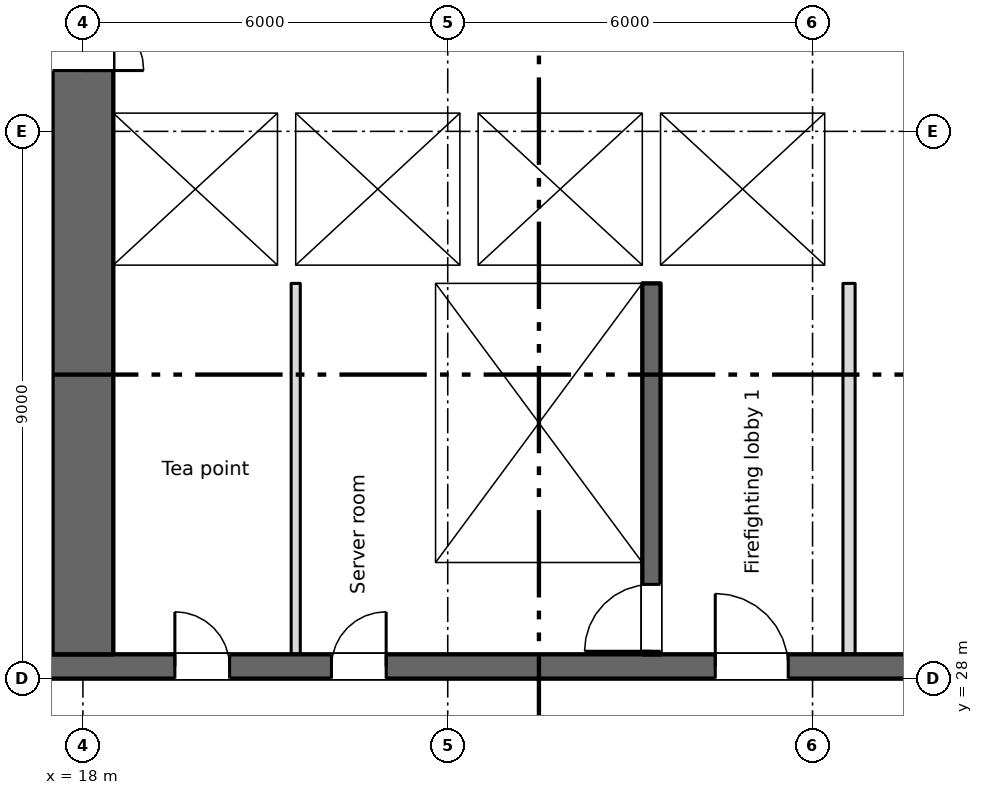
"""IFC4 building model, lengths in metres.
Left out: names, types, materials, properties, quantities, classifications, styles, units other than length and angle.
Written with IfcOpenShell. Run it as: python <this file> out.ifc"""

import sys

from ifc_helpers import new_model, si_unit, direction, frame, frame_2d, origin, place, context, subcontext, project, spatial, rectangle, extrude, element, fill, save


model = new_model("IFC4")
c1 = context("Model", 3, precision=1e-05, world=origin(), true_north=direction((0.0, 1.0)))
c2 = subcontext(c1, "Body", "Model", "MODEL_VIEW")
j1 = project(units=[si_unit("LENGTHUNIT", "METRE"), si_unit("PLANEANGLEUNIT", "RADIAN")], contexts=[c1])
p1 = place(None, origin())
s1 = spatial("IfcSite", under=j1, at=p1, CompositionType="ELEMENT")
p2 = place(p1, origin())
s2 = spatial("IfcBuilding", under=s1, at=p2, CompositionType="ELEMENT")
p3 = place(p2, frame((0.0, 0.0, 45.0)))
s3 = spatial("IfcBuildingStorey", under=s2, at=p3, CompositionType="ELEMENT", Elevation=45.0)
p4 = place(p3, frame((6.7, 28.2, 0.0), z_axis=(0.0, 0.0, 1.0), x_axis=(1.0, 0.0, 0.0)))
e1 = element("IfcWall", 1, at=p4, inside=s3, PredefinedType="SHEAR", context=c2, shape_type="SweptSolid", body=[
    extrude(rectangle(XDim=57.8, YDim=0.4, at=frame_2d((28.9, 0.0))), origin(), (0.0, 0.0, 1.0), 3.35),
])
p5 = place(p4, frame((12.812, 0.0, 0.0)))
e2 = element("IfcOpeningElement", 2, at=p5, cuts=e1, PredefinedType="OPENING", context=c2, shape_type="SweptSolid", body=[
    extrude(rectangle(XDim=0.9, YDim=2.1, at=frame_2d((0.45, 1.05))), frame((0.0, 0.21, 0.0), z_axis=(0.0, -1.0, 0.0), x_axis=(1.0, 0.0, 0.0)), (0.0, 0.0, 1.0), 0.42),
])
p6 = place(p4, frame((15.387, 0.0, 0.0)))
e3 = element("IfcOpeningElement", 3, at=p6, cuts=e1, PredefinedType="OPENING", context=c2, shape_type="SweptSolid", body=[
    extrude(rectangle(XDim=0.9, YDim=2.1, at=frame_2d((0.45, 1.05))), frame((0.0, 0.21, 0.0), z_axis=(0.0, -1.0, 0.0), x_axis=(1.0, 0.0, 0.0)), (0.0, 0.0, 1.0), 0.42),
])
p7 = place(p4, frame((48.312, 0.0, 0.0)))
e4 = element("IfcOpeningElement", 4, at=p7, cuts=e1, PredefinedType="OPENING", context=c2, shape_type="SweptSolid", body=[
    extrude(rectangle(XDim=0.9, YDim=2.1, at=frame_2d((0.45, 1.05))), frame((0.0, 0.21, 0.0), z_axis=(0.0, -1.0, 0.0), x_axis=(1.0, 0.0, 0.0)), (0.0, 0.0, 1.0), 0.42),
])
p8 = place(p4, frame((50.887, 0.0, 0.0)))
e5 = element("IfcOpeningElement", 5, at=p8, cuts=e1, PredefinedType="OPENING", context=c2, shape_type="SweptSolid", body=[
    extrude(rectangle(XDim=0.9, YDim=2.1, at=frame_2d((0.45, 1.05))), frame((0.0, 0.21, 0.0), z_axis=(0.0, -1.0, 0.0), x_axis=(1.0, 0.0, 0.0)), (0.0, 0.0, 1.0), 0.42),
])
p9 = place(p4, frame((0.562, 0.0, 0.0)))
e6 = element("IfcOpeningElement", 6, at=p9, cuts=e1, PredefinedType="OPENING", context=c2, shape_type="SweptSolid", body=[
    extrude(rectangle(XDim=0.9, YDim=2.1, at=frame_2d((0.45, 1.05))), frame((0.0, 0.21, 0.0), z_axis=(0.0, -1.0, 0.0), x_axis=(1.0, 0.0, 0.0)), (0.0, 0.0, 1.0), 0.42),
])
p10 = place(p4, frame((2.137, 0.0, 0.0)))
e7 = element("IfcOpeningElement", 7, at=p10, cuts=e1, PredefinedType="OPENING", context=c2, shape_type="SweptSolid", body=[
    extrude(rectangle(XDim=0.9, YDim=2.1, at=frame_2d((0.45, 1.05))), frame((0.0, 0.21, 0.0), z_axis=(0.0, -1.0, 0.0), x_axis=(1.0, 0.0, 0.0)), (0.0, 0.0, 1.0), 0.42),
])
p11 = place(p4, frame((4.7, 0.0, 0.0)))
e8 = element("IfcOpeningElement", 8, at=p11, cuts=e1, PredefinedType="OPENING", context=c2, shape_type="SweptSolid", body=[
    extrude(rectangle(XDim=1.2, YDim=2.1, at=frame_2d((0.6, 1.05))), frame((0.0, 0.21, 0.0), z_axis=(0.0, -1.0, 0.0), x_axis=(1.0, 0.0, 0.0)), (0.0, 0.0, 1.0), 0.42),
])
p12 = place(p4, frame((31.7, 0.0, 0.0)))
e9 = element("IfcOpeningElement", 9, at=p12, cuts=e1, PredefinedType="OPENING", context=c2, shape_type="SweptSolid", body=[
    extrude(rectangle(XDim=1.2, YDim=2.1, at=frame_2d((0.6, 1.05))), frame((0.0, 0.21, 0.0), z_axis=(0.0, -1.0, 0.0), x_axis=(1.0, 0.0, 0.0)), (0.0, 0.0, 1.0), 0.42),
])
p13 = place(p4, frame((55.2, 0.0, 0.0)))
e10 = element("IfcOpeningElement", 10, at=p13, cuts=e1, PredefinedType="OPENING", context=c2, shape_type="SweptSolid", body=[
    extrude(rectangle(XDim=1.2, YDim=2.1, at=frame_2d((0.6, 1.05))), frame((0.0, 0.21, 0.0), z_axis=(0.0, -1.0, 0.0), x_axis=(1.0, 0.0, 0.0)), (0.0, 0.0, 1.0), 0.42),
])
p14 = place(p4, frame((21.7, 0.0, 0.0)))
e11 = element("IfcOpeningElement", 11, at=p14, cuts=e1, PredefinedType="OPENING", context=c2, shape_type="SweptSolid", body=[
    extrude(rectangle(XDim=1.2, YDim=2.1, at=frame_2d((0.6, 1.05))), frame((0.0, 0.21, 0.0), z_axis=(0.0, -1.0, 0.0), x_axis=(1.0, 0.0, 0.0)), (0.0, 0.0, 1.0), 0.42),
])
p15 = place(p4, frame((41.7, 0.0, 0.0)))
e12 = element("IfcOpeningElement", 12, at=p15, cuts=e1, PredefinedType="OPENING", context=c2, shape_type="SweptSolid", body=[
    extrude(rectangle(XDim=1.2, YDim=2.1, at=frame_2d((0.6, 1.05))), frame((0.0, 0.21, 0.0), z_axis=(0.0, -1.0, 0.0), x_axis=(1.0, 0.0, 0.0)), (0.0, 0.0, 1.0), 0.42),
])
p16 = place(p4, frame((24.85, 0.0, 0.0)))
e13 = element("IfcOpeningElement", 13, at=p16, cuts=e1, PredefinedType="OPENING", context=c2, shape_type="SweptSolid", body=[
    extrude(rectangle(XDim=2.4, YDim=2.1, at=frame_2d((1.2, 1.05))), frame((0.0, 0.21, 0.0), z_axis=(0.0, -1.0, 0.0), x_axis=(1.0, 0.0, 0.0)), (0.0, 0.0, 1.0), 0.42),
])
p17 = place(p4, frame((37.35, 0.0, 0.0)))
e14 = element("IfcOpeningElement", 14, at=p17, cuts=e1, PredefinedType="OPENING", context=c2, shape_type="SweptSolid", body=[
    extrude(rectangle(XDim=2.4, YDim=2.1, at=frame_2d((1.2, 1.05))), frame((0.0, 0.21, 0.0), z_axis=(0.0, -1.0, 0.0), x_axis=(1.0, 0.0, 0.0)), (0.0, 0.0, 1.0), 0.42),
])
p18 = place(p4, frame((7.85, 0.0, 0.0)))
e15 = element("IfcOpeningElement", 15, at=p18, cuts=e1, PredefinedType="OPENING", context=c2, shape_type="SweptSolid", body=[
    extrude(rectangle(XDim=2.4, YDim=2.1, at=frame_2d((1.2, 1.05))), frame((0.0, 0.21, 0.0), z_axis=(0.0, -1.0, 0.0), x_axis=(1.0, 0.0, 0.0)), (0.0, 0.0, 1.0), 0.42),
])
p19 = place(p4, frame((28.85, 0.0, 0.0)))
e16 = element("IfcOpeningElement", 16, at=p19, cuts=e1, PredefinedType="OPENING", context=c2, shape_type="SweptSolid", body=[
    extrude(rectangle(XDim=0.9, YDim=2.1, at=frame_2d((0.45, 1.05))), frame((0.0, 0.21, 0.0), z_axis=(0.0, -1.0, 0.0), x_axis=(1.0, 0.0, 0.0)), (0.0, 0.0, 1.0), 0.42),
])
p20 = place(p4, frame((34.85, 0.0, 0.0)))
e17 = element("IfcOpeningElement", 17, at=p20, cuts=e1, PredefinedType="OPENING", context=c2, shape_type="SweptSolid", body=[
    extrude(rectangle(XDim=0.9, YDim=2.1, at=frame_2d((0.45, 1.05))), frame((0.0, 0.21, 0.0), z_axis=(0.0, -1.0, 0.0), x_axis=(1.0, 0.0, 0.0)), (0.0, 0.0, 1.0), 0.42),
])
p21 = place(p3, frame((18.0, 28.4, 0.0), z_axis=(0.0, 0.0, 1.0), x_axis=(0.0, 1.0, 0.0)))
e18 = element("IfcWall", 18, at=p21, inside=s3, PredefinedType="SHEAR", context=c2, shape_type="SweptSolid", body=[
    extrude(rectangle(XDim=16.6, YDim=1.0, at=frame_2d((8.3, 0.0))), origin(), (0.0, 0.0, 1.0), 3.35),
])
p22 = place(p21, frame((9.6, 0.0, 0.0)))
e19 = element("IfcOpeningElement", 19, at=p22, cuts=e18, PredefinedType="OPENING", context=c2, shape_type="SweptSolid", body=[
    extrude(rectangle(XDim=2.0, YDim=2.1, at=frame_2d((1.0, 1.05))), frame((0.0, 0.51, 0.0), z_axis=(0.0, -1.0, 0.0), x_axis=(1.0, 0.0, 0.0)), (0.0, 0.0, 1.0), 1.02),
])
p23 = place(p21, frame((15.25, 0.0, 0.0)))
e20 = element("IfcOpeningElement", 20, at=p23, cuts=e18, PredefinedType="OPENING", context=c2, shape_type="SweptSolid", body=[
    extrude(rectangle(XDim=1.2, YDim=2.1, at=frame_2d((0.6, 1.05))), frame((0.0, 0.51, 0.0), z_axis=(0.0, -1.0, 0.0), x_axis=(1.0, 0.0, 0.0)), (0.0, 0.0, 1.0), 1.02),
])
p24 = place(p3, frame((23.65, 28.4, 0.0), z_axis=(0.0, 0.0, 1.0), x_axis=(0.0, 1.0, 0.0)))
e21 = element("IfcWall", 21, at=p24, inside=s3, PredefinedType="SHEAR", context=c2, shape_type="SweptSolid", body=[
    extrude(rectangle(XDim=6.1, YDim=0.3, at=frame_2d((3.05, 0.0))), origin(), (0.0, 0.0, 1.0), 3.35),
])
p25 = place(p3, frame((27.35, 28.4, 0.0), z_axis=(0.0, 0.0, 1.0), x_axis=(0.0, 1.0, 0.0)))
e22 = element("IfcWall", 22, at=p25, inside=s3, PredefinedType="SHEAR", context=c2, shape_type="SweptSolid", body=[
    extrude(rectangle(XDim=6.1, YDim=0.3, at=frame_2d((3.05, 0.0))), origin(), (0.0, 0.0, 1.0), 3.35),
])
p26 = place(p25, frame((0.05, 0.0, 0.0)))
e23 = element("IfcOpeningElement", 23, at=p26, cuts=e22, PredefinedType="OPENING", context=c2, shape_type="SweptSolid", body=[
    extrude(rectangle(XDim=1.1, YDim=2.1, at=frame_2d((0.55, 1.05))), frame((0.0, 0.16, 0.0), z_axis=(0.0, -1.0, 0.0), x_axis=(1.0, 0.0, 0.0)), (0.0, 0.0, 1.0), 0.32),
])
p27 = place(p3, frame((18.5, 34.65, 0.0), z_axis=(0.0, 0.0, 1.0), x_axis=(1.0, 0.0, 0.0)))
e24 = element("IfcWall", 24, at=p27, inside=s3, PredefinedType="SHEAR", context=c2, shape_type="SweptSolid", body=[
    extrude(rectangle(XDim=12.2, YDim=0.3, at=frame_2d((6.1, 0.0))), origin(), (0.0, 0.0, 1.0), 3.35),
])
p28 = place(p27, frame((9.8, 0.0, 0.0)))
e25 = element("IfcOpeningElement", 25, at=p28, cuts=e24, PredefinedType="OPENING", context=c2, shape_type="SweptSolid", body=[
    extrude(rectangle(XDim=1.1, YDim=2.1, at=frame_2d((0.55, 1.05))), frame((0.0, 0.16, 0.0), z_axis=(0.0, -1.0, 0.0), x_axis=(1.0, 0.0, 0.0)), (0.0, 0.0, 1.0), 0.32),
])
p29 = place(p3, frame((18.5, 37.45, 0.0), z_axis=(0.0, 0.0, 1.0), x_axis=(1.0, 0.0, 0.0)))
e26 = element("IfcWall", 26, at=p29, inside=s3, PredefinedType="SHEAR", context=c2, shape_type="SweptSolid", body=[
    extrude(rectangle(XDim=12.2, YDim=0.3, at=frame_2d((6.1, 0.0))), origin(), (0.0, 0.0, 1.0), 3.35),
])
p30 = place(p29, frame((0.8, 0.0, 0.0)))
e27 = element("IfcOpeningElement", 27, at=p30, cuts=e26, PredefinedType="OPENING", context=c2, shape_type="SweptSolid", body=[
    extrude(rectangle(XDim=1.1, YDim=2.1, at=frame_2d((0.55, 1.05))), frame((0.0, 0.16, 0.0), z_axis=(0.0, -1.0, 0.0), x_axis=(1.0, 0.0, 0.0)), (0.0, 0.0, 1.0), 0.32),
])
p31 = place(p29, frame((3.8, 0.0, 0.0)))
e28 = element("IfcOpeningElement", 28, at=p31, cuts=e26, PredefinedType="OPENING", context=c2, shape_type="SweptSolid", body=[
    extrude(rectangle(XDim=1.1, YDim=2.1, at=frame_2d((0.55, 1.05))), frame((0.0, 0.16, 0.0), z_axis=(0.0, -1.0, 0.0), x_axis=(1.0, 0.0, 0.0)), (0.0, 0.0, 1.0), 0.32),
])
p32 = place(p29, frame((6.8, 0.0, 0.0)))
e29 = element("IfcOpeningElement", 29, at=p32, cuts=e26, PredefinedType="OPENING", context=c2, shape_type="SweptSolid", body=[
    extrude(rectangle(XDim=1.1, YDim=2.1, at=frame_2d((0.55, 1.05))), frame((0.0, 0.16, 0.0), z_axis=(0.0, -1.0, 0.0), x_axis=(1.0, 0.0, 0.0)), (0.0, 0.0, 1.0), 0.32),
])
p33 = place(p3, frame((27.35, 34.8, 0.0), z_axis=(0.0, 0.0, 1.0), x_axis=(0.0, 1.0, 0.0)))
e30 = element("IfcWall", 30, at=p33, inside=s3, PredefinedType="SHEAR", context=c2, shape_type="SweptSolid", body=[
    extrude(rectangle(XDim=2.5, YDim=0.3, at=frame_2d((1.25, 0.0))), origin(), (0.0, 0.0, 1.0), 3.35),
])
p34 = place(p3, frame((30.45, 34.8, 0.0), z_axis=(0.0, 0.0, 1.0), x_axis=(0.0, 1.0, 0.0)))
e31 = element("IfcWall", 31, at=p34, inside=s3, PredefinedType="SHEAR", context=c2, shape_type="SweptSolid", body=[
    extrude(rectangle(XDim=2.5, YDim=0.5, at=frame_2d((1.25, 0.0))), origin(), (0.0, 0.0, 1.0), 3.35),
])
for number, where, z_axis, x_axis in (
    (32, (21.35, 34.8, 0.0), (0.0, 0.0, 1.0), (0.0, 1.0, 0.0)),
    (33, (24.35, 34.8, 0.0), (0.0, 0.0, 1.0), (0.0, 1.0, 0.0)),
):
    element("IfcWall", number, at=place(p3, frame(where, z_axis=z_axis, x_axis=x_axis)), inside=s3, PredefinedType="SHEAR", context=c2, shape_type="SweptSolid", body=[
        extrude(rectangle(XDim=2.5, YDim=0.3, at=frame_2d((1.25, 0.0))), origin(), (0.0, 0.0, 1.0), 3.35),
    ])
p35 = place(p3, frame((30.6, 28.4, 0.0), z_axis=(0.0, 0.0, 1.0), x_axis=(0.0, 1.0, 0.0)))
e34 = element("IfcWall", 34, at=p35, inside=s3, PredefinedType="PARTITIONING", context=c2, shape_type="SweptSolid", body=[
    extrude(rectangle(XDim=6.1, YDim=0.2, at=frame_2d((3.05, 0.0))), origin(), (0.0, 0.0, 1.0), 3.35),
])
p36 = place(p3, frame((21.5, 28.4, 0.0), z_axis=(0.0, 0.0, 1.0), x_axis=(0.0, 1.0, 0.0)))
e35 = element("IfcWall", 35, at=p36, inside=s3, PredefinedType="PARTITIONING", context=c2, shape_type="SweptSolid", body=[
    extrude(rectangle(XDim=6.1, YDim=0.15, at=frame_2d((3.05, 0.0))), origin(), (0.0, 0.0, 1.0), 3.35),
])
p37 = place(p5, origin())
e36 = element("IfcDoor", 36, at=p37, inside=s3, OperationType="SINGLE_SWING_LEFT", PredefinedType="DOOR", context=c2, shape_type="SweptSolid", body=[
    extrude(rectangle(XDim=0.9, YDim=2.1, at=frame_2d((0.45, 1.05))), frame((0.0, 0.025, 0.0), z_axis=(0.0, -1.0, 0.0), x_axis=(1.0, 0.0, 0.0)), (0.0, 0.0, 1.0), 0.05),
])
fill(e2, e36)
p38 = place(p6, origin())
e37 = element("IfcDoor", 37, at=p38, inside=s3, OperationType="SINGLE_SWING_RIGHT", PredefinedType="DOOR", context=c2, shape_type="SweptSolid", body=[
    extrude(rectangle(XDim=0.9, YDim=2.1, at=frame_2d((0.45, 1.05))), frame((0.0, 0.025, 0.0), z_axis=(0.0, -1.0, 0.0), x_axis=(1.0, 0.0, 0.0)), (0.0, 0.0, 1.0), 0.05),
])
fill(e3, e37)
p39 = place(p30, origin())
e38 = element("IfcDoor", 38, at=p39, inside=s3, OperationType="SLIDING_TO_LEFT", PredefinedType="DOOR", context=c2, shape_type="SweptSolid", body=[
    extrude(rectangle(XDim=1.1, YDim=2.1, at=frame_2d((0.55, 1.05))), frame((0.0, 0.025, 0.0), z_axis=(0.0, -1.0, 0.0), x_axis=(1.0, 0.0, 0.0)), (0.0, 0.0, 1.0), 0.05),
])
fill(e27, e38)
p40 = place(p31, origin())
e39 = element("IfcDoor", 39, at=p40, inside=s3, OperationType="SLIDING_TO_LEFT", PredefinedType="DOOR", context=c2, shape_type="SweptSolid", body=[
    extrude(rectangle(XDim=1.1, YDim=2.1, at=frame_2d((0.55, 1.05))), frame((0.0, 0.025, 0.0), z_axis=(0.0, -1.0, 0.0), x_axis=(1.0, 0.0, 0.0)), (0.0, 0.0, 1.0), 0.05),
])
fill(e28, e39)
p41 = place(p32, origin())
e40 = element("IfcDoor", 40, at=p41, inside=s3, OperationType="SLIDING_TO_LEFT", PredefinedType="DOOR", context=c2, shape_type="SweptSolid", body=[
    extrude(rectangle(XDim=1.1, YDim=2.1, at=frame_2d((0.55, 1.05))), frame((0.0, 0.025, 0.0), z_axis=(0.0, -1.0, 0.0), x_axis=(1.0, 0.0, 0.0)), (0.0, 0.0, 1.0), 0.05),
])
fill(e29, e40)
p42 = place(p28, origin())
e41 = element("IfcDoor", 41, at=p42, inside=s3, OperationType="SLIDING_TO_LEFT", PredefinedType="DOOR", context=c2, shape_type="SweptSolid", body=[
    extrude(rectangle(XDim=1.1, YDim=2.1, at=frame_2d((0.55, 1.05))), frame((0.0, 0.025, 0.0), z_axis=(0.0, -1.0, 0.0), x_axis=(1.0, 0.0, 0.0)), (0.0, 0.0, 1.0), 0.05),
])
fill(e25, e41)
p43 = place(p26, origin())
e42 = element("IfcDoor", 42, at=p43, inside=s3, OperationType="SINGLE_SWING_LEFT", PredefinedType="DOOR", context=c2, shape_type="SweptSolid", body=[
    extrude(rectangle(XDim=1.1, YDim=2.1, at=frame_2d((0.55, 1.05))), frame((0.0, 0.025, 0.0), z_axis=(0.0, -1.0, 0.0), x_axis=(1.0, 0.0, 0.0)), (0.0, 0.0, 1.0), 0.05),
])
fill(e23, e42)
p44 = place(p14, origin())
e43 = element("IfcDoor", 43, at=p44, inside=s3, OperationType="SINGLE_SWING_LEFT", PredefinedType="DOOR", context=c2, shape_type="SweptSolid", body=[
    extrude(rectangle(XDim=1.2, YDim=2.1, at=frame_2d((0.6, 1.05))), frame((0.0, 0.025, 0.0), z_axis=(0.0, -1.0, 0.0), x_axis=(1.0, 0.0, 0.0)), (0.0, 0.0, 1.0), 0.05),
])
fill(e11, e43)
p45 = place(p22, origin())
e44 = element("IfcDoor", 44, at=p45, inside=s3, OperationType="DOUBLE_DOOR_SINGLE_SWING", PredefinedType="DOOR", context=c2, shape_type="SweptSolid", body=[
    extrude(rectangle(XDim=2.0, YDim=2.1, at=frame_2d((1.0, 1.05))), frame((0.0, 0.025, 0.0), z_axis=(0.0, -1.0, 0.0), x_axis=(1.0, 0.0, 0.0)), (0.0, 0.0, 1.0), 0.05),
])
fill(e19, e44)
save(model, sys.argv[1])
